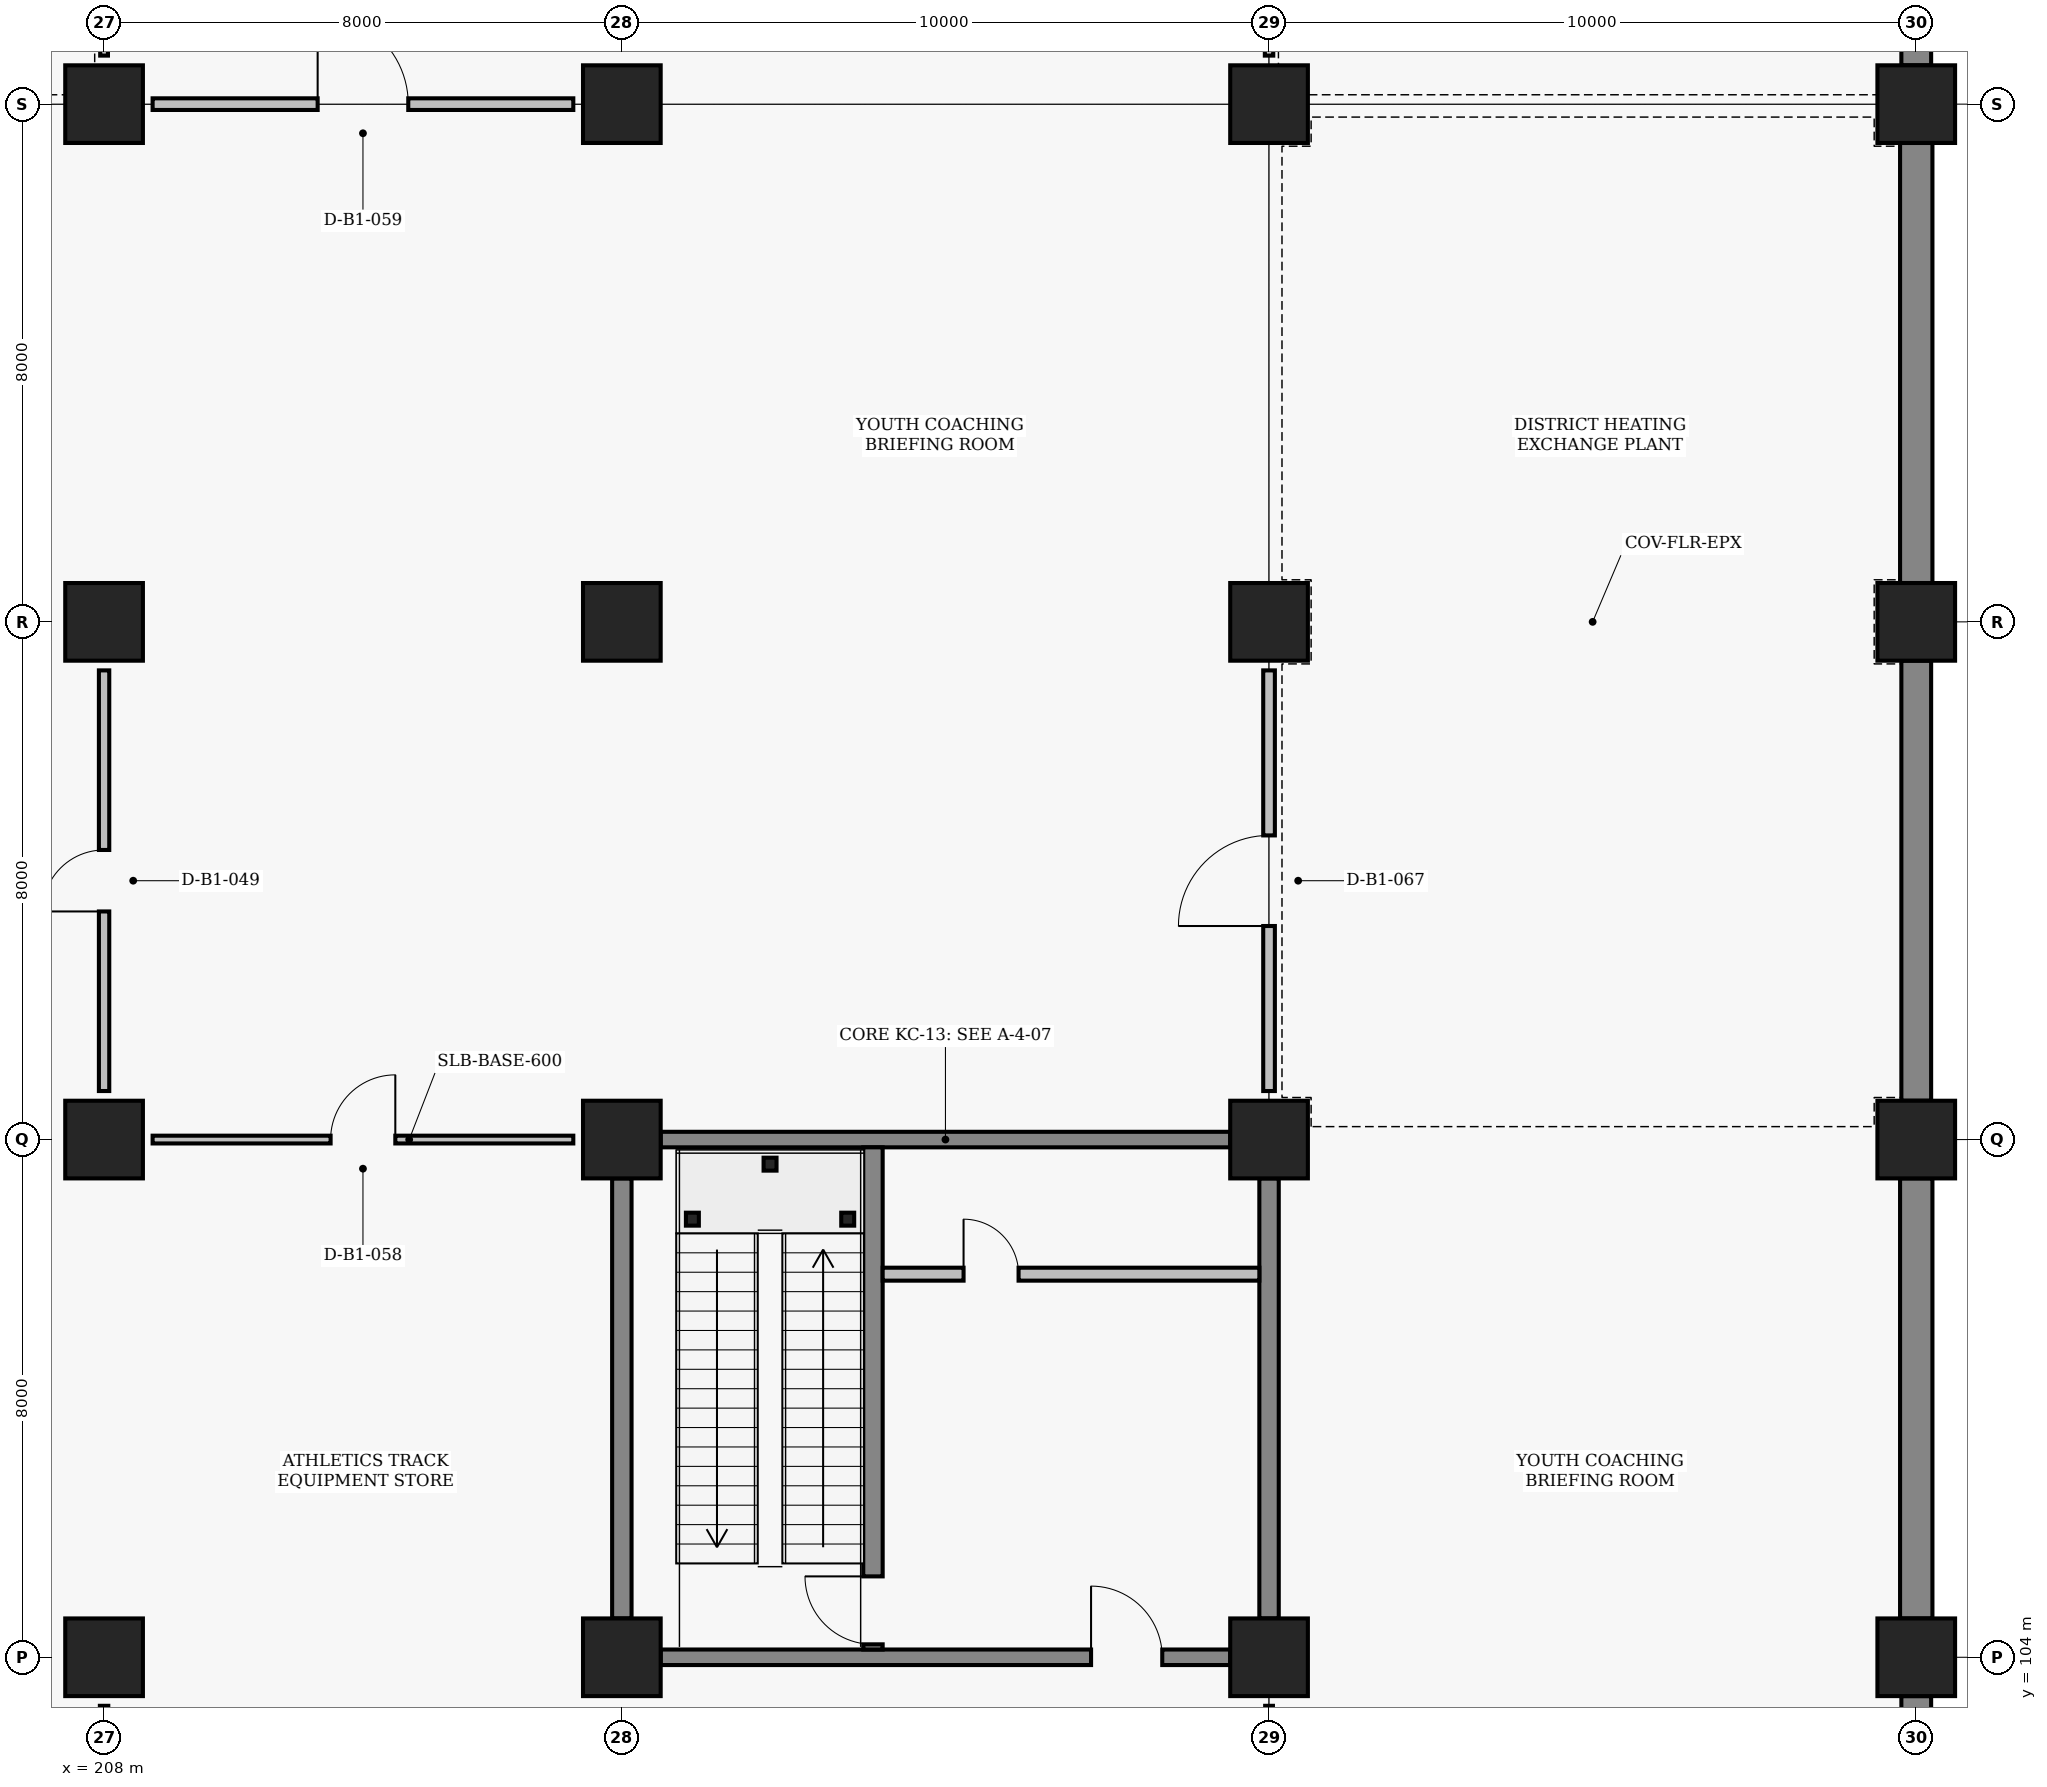
"""IFC4 building model, lengths in metres.
Left out: names, types, materials, properties, quantities, classifications, styles, units other than length and angle.
Written with IfcOpenShell. Run it as: python <this file> out.ifc"""

import sys

from ifc_helpers import new_model, si_unit, direction, frame, frame_2d, origin, origin_2d, place, context, subcontext, project, spatial, rectangle, hollow_rectangle, extrude, element, fill, save


model = new_model("IFC4")
c1 = context("Model", 3, precision=1e-05, world=origin(), true_north=direction((0.0, 1.0)))
c2 = subcontext(c1, "Body", "Model", "MODEL_VIEW")
j1 = project(units=[si_unit("LENGTHUNIT", "METRE"), si_unit("PLANEANGLEUNIT", "RADIAN")], contexts=[c1])
p1 = place(None, origin())
s1 = spatial("IfcSite", under=j1, at=p1, CompositionType="ELEMENT")
p2 = place(p1, origin())
s2 = spatial("IfcBuilding", under=s1, at=p2, CompositionType="ELEMENT")
p3 = place(p2, frame((0.0, 0.0, -5.4)))
s3 = spatial("IfcBuildingStorey", under=s2, at=p3, CompositionType="ELEMENT", Elevation=-5.4)
for number, where, z_axis, x_axis in (
    (1, (208.0, 104.0, 0.0), (0.0, 0.0, 1.0), (1.0, 0.0, 0.0)),
    (2, (208.0, 112.0, 0.0), (0.0, 0.0, 1.0), (1.0, 0.0, 0.0)),
    (3, (208.0, 120.0, 0.0), (0.0, 0.0, 1.0), (1.0, 0.0, 0.0)),
    (4, (208.0, 128.0, 0.0), (0.0, 0.0, 1.0), (1.0, 0.0, 0.0)),
    (5, (216.0, 104.0, 0.0), (0.0, 0.0, 1.0), (1.0, 0.0, 0.0)),
    (6, (216.0, 112.0, 0.0), (0.0, 0.0, 1.0), (1.0, 0.0, 0.0)),
    (7, (216.0, 120.0, 0.0), (0.0, 0.0, 1.0), (1.0, 0.0, 0.0)),
    (8, (216.0, 128.0, 0.0), (0.0, 0.0, 1.0), (1.0, 0.0, 0.0)),
    (9, (226.0, 104.0, 0.0), (0.0, 0.0, 1.0), (1.0, 0.0, 0.0)),
    (10, (226.0, 112.0, 0.0), (0.0, 0.0, 1.0), (1.0, 0.0, 0.0)),
    (11, (226.0, 120.0, 0.0), (0.0, 0.0, 1.0), (1.0, 0.0, 0.0)),
    (12, (226.0, 128.0, 0.0), (0.0, 0.0, 1.0), (1.0, 0.0, 0.0)),
    (13, (236.0, 104.0, 0.0), (0.0, 0.0, 1.0), (1.0, 0.0, 0.0)),
    (14, (236.0, 112.0, 0.0), (0.0, 0.0, 1.0), (1.0, 0.0, 0.0)),
    (15, (236.0, 120.0, 0.0), (0.0, 0.0, 1.0), (1.0, 0.0, 0.0)),
    (16, (236.0, 128.0, 0.0), (0.0, 0.0, 1.0), (1.0, 0.0, 0.0)),
):
    element("IfcColumn", number, at=place(p3, frame(where, z_axis=z_axis, x_axis=x_axis)), inside=s3, PredefinedType="COLUMN", context=c2, shape_type="SweptSolid", body=[
        extrude(rectangle(XDim=1.2, YDim=1.2, at=origin_2d()), origin(), (0.0, 0.0, 1.0), 5.4),
    ])
p4 = place(p3, frame((236.0, 96.6, 0.0), z_axis=(0.0, 0.0, 1.0), x_axis=(0.0, 1.0, 0.0)))
e17 = element("IfcWall", 17, at=p4, inside=s3, PredefinedType="STANDARD", context=c2, shape_type="SweptSolid", body=[
    extrude(rectangle(XDim=6.8, YDim=0.46, at=frame_2d((3.4, 0.0))), origin(), (0.0, 0.0, 1.0), 4.24),
])
p5 = place(p3, frame((236.0, 104.6, 0.0), z_axis=(0.0, 0.0, 1.0), x_axis=(0.0, 1.0, 0.0)))
e18 = element("IfcWall", 18, at=p5, inside=s3, PredefinedType="STANDARD", context=c2, shape_type="SweptSolid", body=[
    extrude(rectangle(XDim=6.8, YDim=0.5, at=frame_2d((3.4, 0.0))), origin(), (0.0, 0.0, 1.0), 4.24),
])
p6 = place(p3, frame((236.0, 112.6, 0.0), z_axis=(0.0, 0.0, 1.0), x_axis=(0.0, 1.0, 0.0)))
e19 = element("IfcWall", 19, at=p6, inside=s3, PredefinedType="STANDARD", context=c2, shape_type="SweptSolid", body=[
    extrude(rectangle(XDim=6.8, YDim=0.46, at=frame_2d((3.4, 0.0))), origin(), (0.0, 0.0, 1.0), 4.24),
])
p7 = place(p3, frame((236.0, 120.6, 0.0), z_axis=(0.0, 0.0, 1.0), x_axis=(0.0, 1.0, 0.0)))
e20 = element("IfcWall", 20, at=p7, inside=s3, PredefinedType="STANDARD", context=c2, shape_type="SweptSolid", body=[
    extrude(rectangle(XDim=6.8, YDim=0.5, at=frame_2d((3.4, 0.0))), origin(), (0.0, 0.0, 1.0), 4.24),
])
p8 = place(p3, frame((236.0, 128.6, 0.0), z_axis=(0.0, 0.0, 1.0), x_axis=(0.0, 1.0, 0.0)))
e21 = element("IfcWall", 21, at=p8, inside=s3, PredefinedType="STANDARD", context=c2, shape_type="SweptSolid", body=[
    extrude(rectangle(XDim=6.8, YDim=0.46, at=frame_2d((3.4, 0.0))), origin(), (0.0, 0.0, 1.0), 4.24),
])
p9 = place(p3, frame((216.6, 104.0, 0.0), z_axis=(0.0, 0.0, 1.0), x_axis=(1.0, 0.0, 0.0)))
e22 = element("IfcWall", 22, at=p9, inside=s3, PredefinedType="SHEAR", context=c2, shape_type="SweptSolid", body=[
    extrude(rectangle(XDim=8.8, YDim=0.24, at=frame_2d((4.4, 0.0))), origin(), (0.0, 0.0, 1.0), 4.59),
])
p10 = place(p9, frame((6.65, 0.0, 0.0)))
e23 = element("IfcOpeningElement", 23, at=p10, cuts=e22, PredefinedType="OPENING", context=c2, shape_type="SweptSolid", body=[
    extrude(rectangle(XDim=1.1, YDim=2.2, at=frame_2d((0.55, 1.1))), frame((0.0, 0.13, 0.0), z_axis=(0.0, -1.0, 0.0), x_axis=(1.0, 0.0, 0.0)), (0.0, 0.0, 1.0), 0.26),
])
p11 = place(p3, frame((216.6, 112.0, 0.0), z_axis=(0.0, 0.0, 1.0), x_axis=(1.0, 0.0, 0.0)))
e24 = element("IfcWall", 24, at=p11, inside=s3, PredefinedType="SHEAR", context=c2, shape_type="SweptSolid", body=[
    extrude(rectangle(XDim=8.8, YDim=0.24, at=frame_2d((4.4, 0.0))), origin(), (0.0, 0.0, 1.0), 4.59),
])
for number, where, z_axis, x_axis in (
    (25, (216.0, 104.6, 0.0), (0.0, 0.0, 1.0), (0.0, 1.0, 0.0)),
    (26, (226.0, 104.6, 0.0), (0.0, 0.0, 1.0), (0.0, 1.0, 0.0)),
):
    element("IfcWall", number, at=place(p3, frame(where, z_axis=z_axis, x_axis=x_axis)), inside=s3, PredefinedType="SHEAR", context=c2, shape_type="SweptSolid", body=[
        extrude(rectangle(XDim=6.8, YDim=0.3, at=frame_2d((3.4, 0.0))), origin(), (0.0, 0.0, 1.0), 4.39),
    ])
p12 = place(p3, frame((219.88, 104.12, 0.0), z_axis=(0.0, 0.0, 1.0), x_axis=(0.0, 1.0, 0.0)))
e27 = element("IfcWall", 27, at=p12, inside=s3, PredefinedType="SHEAR", context=c2, shape_type="SweptSolid", body=[
    extrude(rectangle(XDim=7.76, YDim=0.3, at=frame_2d((3.88, 0.0))), origin(), (0.0, 0.0, 1.0), 4.59),
])
p13 = place(p12, frame((0.08, 0.0, 0.0)))
e28 = element("IfcOpeningElement", 28, at=p13, cuts=e27, PredefinedType="OPENING", context=c2, shape_type="SweptSolid", body=[
    extrude(rectangle(XDim=1.05, YDim=2.15, at=frame_2d((0.525, 1.075))), frame((0.0, 0.16, 0.0), z_axis=(0.0, -1.0, 0.0), x_axis=(1.0, 0.0, 0.0)), (0.0, 0.0, 1.0), 0.32),
])
p14 = place(p3, frame((220.03, 109.92, 0.0), z_axis=(0.0, 0.0, 1.0), x_axis=(1.0, 0.0, 0.0)))
e29 = element("IfcWall", 29, at=p14, inside=s3, PredefinedType="PARTITIONING", context=c2, shape_type="SweptSolid", body=[
    extrude(rectangle(XDim=5.82, YDim=0.2, at=frame_2d((2.91, 0.0))), origin(), (0.0, 0.0, 1.0), 4.39),
])
p15 = place(p14, frame((1.25, 0.0, 0.0)))
e30 = element("IfcOpeningElement", 30, at=p15, cuts=e29, PredefinedType="OPENING", context=c2, shape_type="SweptSolid", body=[
    extrude(rectangle(XDim=0.85, YDim=2.05, at=frame_2d((0.425, 1.025))), frame((0.0, 0.11, 0.0), z_axis=(0.0, -1.0, 0.0), x_axis=(1.0, 0.0, 0.0)), (0.0, 0.0, 1.0), 0.22),
])
for number, where, z_axis, x_axis in (
    (31, (217.09, 110.77, 0.0), (0.0, 0.0, 1.0), (1.0, 0.0, 0.0)),
    (32, (219.49, 110.77, 0.0), (0.0, 0.0, 1.0), (1.0, 0.0, 0.0)),
    (33, (218.29, 111.62, 0.0), (0.0, 0.0, 1.0), (1.0, 0.0, 0.0)),
):
    element("IfcColumn", number, at=place(p3, frame(where, z_axis=z_axis, x_axis=x_axis)), inside=s3, PredefinedType="COLUMN", context=c2, shape_type="SweptSolid", body=[
        extrude(hollow_rectangle(XDim=0.2, YDim=0.2, WallThickness=0.009, at=origin_2d()), origin(), (0.0, 0.0, 1.0), 2.5),
    ])
p16 = place(p3, frame((208.0, 96.75, 0.0), z_axis=(0.0, 0.0, 1.0), x_axis=(0.0, 1.0, 0.0)))
e34 = element("IfcWall", 34, at=p16, inside=s3, PredefinedType="PARTITIONING", context=c2, shape_type="SweptSolid", body=[
    extrude(rectangle(XDim=6.5, YDim=0.13, at=frame_2d((3.25, 0.0))), origin(), (0.0, 0.0, 1.0), 4.39),
])
p17 = place(p16, frame((2.75, 0.0, 0.0)))
e35 = element("IfcOpeningElement", 35, at=p17, cuts=e34, PredefinedType="OPENING", context=c2, shape_type="SweptSolid", body=[
    extrude(rectangle(XDim=1.0, YDim=2.1, at=frame_2d((0.5, 1.05))), frame((0.0, 0.075, 0.0), z_axis=(0.0, -1.0, 0.0), x_axis=(1.0, 0.0, 0.0)), (0.0, 0.0, 1.0), 0.15),
])
p18 = place(p3, frame((208.0, 112.75, 0.0), z_axis=(0.0, 0.0, 1.0), x_axis=(0.0, 1.0, 0.0)))
e36 = element("IfcWall", 36, at=p18, inside=s3, PredefinedType="PARTITIONING", context=c2, shape_type="SweptSolid", body=[
    extrude(rectangle(XDim=6.5, YDim=0.16, at=frame_2d((3.25, 0.0))), origin(), (0.0, 0.0, 1.0), 4.39),
])
p19 = place(p18, frame((2.775, 0.0, 0.0)))
e37 = element("IfcOpeningElement", 37, at=p19, cuts=e36, PredefinedType="OPENING", context=c2, shape_type="SweptSolid", body=[
    extrude(rectangle(XDim=0.95, YDim=2.1, at=frame_2d((0.475, 1.05))), frame((0.0, 0.09, 0.0), z_axis=(0.0, -1.0, 0.0), x_axis=(1.0, 0.0, 0.0)), (0.0, 0.0, 1.0), 0.18),
])
p20 = place(p3, frame((208.0, 128.75, 0.0), z_axis=(0.0, 0.0, 1.0), x_axis=(0.0, 1.0, 0.0)))
e38 = element("IfcWall", 38, at=p20, inside=s3, PredefinedType="PARTITIONING", context=c2, shape_type="SweptSolid", body=[
    extrude(rectangle(XDim=6.5, YDim=0.12, at=frame_2d((3.25, 0.0))), origin(), (0.0, 0.0, 1.0), 3.69),
])
p21 = place(p20, frame((2.75, 0.0, 0.0)))
e39 = element("IfcOpeningElement", 39, at=p21, cuts=e38, PredefinedType="OPENING", context=c2, shape_type="SweptSolid", body=[
    extrude(rectangle(XDim=1.0, YDim=2.1, at=frame_2d((0.5, 1.05))), frame((0.0, 0.07, 0.0), z_axis=(0.0, -1.0, 0.0), x_axis=(1.0, 0.0, 0.0)), (0.0, 0.0, 1.0), 0.14),
])
p22 = place(p3, frame((208.75, 112.0, 0.0), z_axis=(0.0, 0.0, 1.0), x_axis=(1.0, 0.0, 0.0)))
e40 = element("IfcWall", 40, at=p22, inside=s3, PredefinedType="PARTITIONING", context=c2, shape_type="SweptSolid", body=[
    extrude(rectangle(XDim=6.5, YDim=0.12, at=frame_2d((3.25, 0.0))), origin(), (0.0, 0.0, 1.0), 4.49),
])
p23 = place(p22, frame((2.75, 0.0, 0.0)))
e41 = element("IfcOpeningElement", 41, at=p23, cuts=e40, PredefinedType="OPENING", context=c2, shape_type="SweptSolid", body=[
    extrude(rectangle(XDim=1.0, YDim=2.1, at=frame_2d((0.5, 1.05))), frame((0.0, 0.07, 0.0), z_axis=(0.0, -1.0, 0.0), x_axis=(1.0, 0.0, 0.0)), (0.0, 0.0, 1.0), 0.14),
])
p24 = place(p3, frame((208.75, 128.0, 0.0), z_axis=(0.0, 0.0, 1.0), x_axis=(1.0, 0.0, 0.0)))
e42 = element("IfcWall", 42, at=p24, inside=s3, PredefinedType="PARTITIONING", context=c2, shape_type="SweptSolid", body=[
    extrude(rectangle(XDim=6.5, YDim=0.18, at=frame_2d((3.25, 0.0))), origin(), (0.0, 0.0, 1.0), 3.69),
])
p25 = place(p24, frame((2.55, 0.0, 0.0)))
e43 = element("IfcOpeningElement", 43, at=p25, cuts=e42, PredefinedType="OPENING", context=c2, shape_type="SweptSolid", body=[
    extrude(rectangle(XDim=1.4, YDim=2.2, at=frame_2d((0.7, 1.1))), frame((0.0, 0.1, 0.0), z_axis=(0.0, -1.0, 0.0), x_axis=(1.0, 0.0, 0.0)), (0.0, 0.0, 1.0), 0.2),
])
p26 = place(p3, frame((226.0, 96.75, 0.0), z_axis=(0.0, 0.0, 1.0), x_axis=(0.0, 1.0, 0.0)))
e44 = element("IfcWall", 44, at=p26, inside=s3, PredefinedType="PARTITIONING", context=c2, shape_type="SweptSolid", body=[
    extrude(rectangle(XDim=6.5, YDim=0.12, at=frame_2d((3.25, 0.0))), origin(), (0.0, 0.0, 1.0), 4.39),
])
p27 = place(p26, frame((2.75, 0.0, 0.0)))
e45 = element("IfcOpeningElement", 45, at=p27, cuts=e44, PredefinedType="OPENING", context=c2, shape_type="SweptSolid", body=[
    extrude(rectangle(XDim=1.0, YDim=2.1, at=frame_2d((0.5, 1.05))), frame((0.0, 0.07, 0.0), z_axis=(0.0, -1.0, 0.0), x_axis=(1.0, 0.0, 0.0)), (0.0, 0.0, 1.0), 0.14),
])
p28 = place(p3, frame((226.0, 112.75, 0.0), z_axis=(0.0, 0.0, 1.0), x_axis=(0.0, 1.0, 0.0)))
e46 = element("IfcWall", 46, at=p28, inside=s3, PredefinedType="PARTITIONING", context=c2, shape_type="SweptSolid", body=[
    extrude(rectangle(XDim=6.5, YDim=0.18, at=frame_2d((3.25, 0.0))), origin(), (0.0, 0.0, 1.0), 4.39),
])
p29 = place(p28, frame((2.55, 0.0, 0.0)))
e47 = element("IfcOpeningElement", 47, at=p29, cuts=e46, PredefinedType="OPENING", context=c2, shape_type="SweptSolid", body=[
    extrude(rectangle(XDim=1.4, YDim=2.2, at=frame_2d((0.7, 1.1))), frame((0.0, 0.1, 0.0), z_axis=(0.0, -1.0, 0.0), x_axis=(1.0, 0.0, 0.0)), (0.0, 0.0, 1.0), 0.2),
])
p30 = place(p3, frame((226.0, 128.75, 0.0), z_axis=(0.0, 0.0, 1.0), x_axis=(0.0, 1.0, 0.0)))
e48 = element("IfcWall", 48, at=p30, inside=s3, PredefinedType="PARTITIONING", context=c2, shape_type="SweptSolid", body=[
    extrude(rectangle(XDim=6.5, YDim=0.13, at=frame_2d((3.25, 0.0))), origin(), (0.0, 0.0, 1.0), 4.39),
])
p31 = place(p30, frame((2.75, 0.0, 0.0)))
e49 = element("IfcOpeningElement", 49, at=p31, cuts=e48, PredefinedType="OPENING", context=c2, shape_type="SweptSolid", body=[
    extrude(rectangle(XDim=1.0, YDim=2.1, at=frame_2d((0.5, 1.05))), frame((0.0, 0.075, 0.0), z_axis=(0.0, -1.0, 0.0), x_axis=(1.0, 0.0, 0.0)), (0.0, 0.0, 1.0), 0.15),
])
p32 = place(p10, origin())
e50 = element("IfcDoor", 50, at=p32, inside=s3, OperationType="SINGLE_SWING_LEFT", PredefinedType="DOOR", context=c2, shape_type="SweptSolid", body=[
    extrude(rectangle(XDim=1.1, YDim=2.2, at=frame_2d((0.55, 1.1))), frame((0.0, 0.025, 0.0), z_axis=(0.0, -1.0, 0.0), x_axis=(1.0, 0.0, 0.0)), (0.0, 0.0, 1.0), 0.05),
])
fill(e23, e50)
p33 = place(p13, origin())
e51 = element("IfcDoor", 51, at=p33, inside=s3, OperationType="SINGLE_SWING_RIGHT", PredefinedType="DOOR", context=c2, shape_type="SweptSolid", body=[
    extrude(rectangle(XDim=1.05, YDim=2.15, at=frame_2d((0.525, 1.075))), frame((0.0, 0.025, 0.0), z_axis=(0.0, -1.0, 0.0), x_axis=(1.0, 0.0, 0.0)), (0.0, 0.0, 1.0), 0.05),
])
fill(e28, e51)
p34 = place(p15, origin())
e52 = element("IfcDoor", 52, at=p34, inside=s3, OperationType="SINGLE_SWING_LEFT", PredefinedType="TRAPDOOR", context=c2, shape_type="SweptSolid", body=[
    extrude(rectangle(XDim=0.85, YDim=2.05, at=frame_2d((0.425, 1.025))), frame((0.0, 0.025, 0.0), z_axis=(0.0, -1.0, 0.0), x_axis=(1.0, 0.0, 0.0)), (0.0, 0.0, 1.0), 0.05),
])
fill(e30, e52)
p35 = place(p19, origin())
e53 = element("IfcDoor", 53, at=p35, inside=s3, OperationType="SINGLE_SWING_LEFT", PredefinedType="DOOR", context=c2, shape_type="SweptSolid", body=[
    extrude(rectangle(XDim=0.95, YDim=2.1, at=frame_2d((0.475, 1.05))), frame((0.0, 0.025, 0.0), z_axis=(0.0, -1.0, 0.0), x_axis=(1.0, 0.0, 0.0)), (0.0, 0.0, 1.0), 0.05),
])
fill(e37, e53)
p36 = place(p23, origin())
e54 = element("IfcDoor", 54, at=p36, inside=s3, OperationType="SINGLE_SWING_RIGHT", PredefinedType="DOOR", context=c2, shape_type="SweptSolid", body=[
    extrude(rectangle(XDim=1.0, YDim=2.1, at=frame_2d((0.5, 1.05))), frame((0.0, 0.025, 0.0), z_axis=(0.0, -1.0, 0.0), x_axis=(1.0, 0.0, 0.0)), (0.0, 0.0, 1.0), 0.05),
])
fill(e41, e54)
p37 = place(p25, origin())
e55 = element("IfcDoor", 55, at=p37, inside=s3, OperationType="SINGLE_SWING_LEFT", PredefinedType="DOOR", context=c2, shape_type="SweptSolid", body=[
    extrude(rectangle(XDim=1.4, YDim=2.2, at=frame_2d((0.7, 1.1))), frame((0.0, 0.025, 0.0), z_axis=(0.0, -1.0, 0.0), x_axis=(1.0, 0.0, 0.0)), (0.0, 0.0, 1.0), 0.05),
])
fill(e43, e55)
p38 = place(p29, origin())
e56 = element("IfcDoor", 56, at=p38, inside=s3, OperationType="SINGLE_SWING_LEFT", PredefinedType="DOOR", context=c2, shape_type="SweptSolid", body=[
    extrude(rectangle(XDim=1.4, YDim=2.2, at=frame_2d((0.7, 1.1))), frame((0.0, 0.025, 0.0), z_axis=(0.0, -1.0, 0.0), x_axis=(1.0, 0.0, 0.0)), (0.0, 0.0, 1.0), 0.05),
])
fill(e47, e56)
save(model, sys.argv[1])
